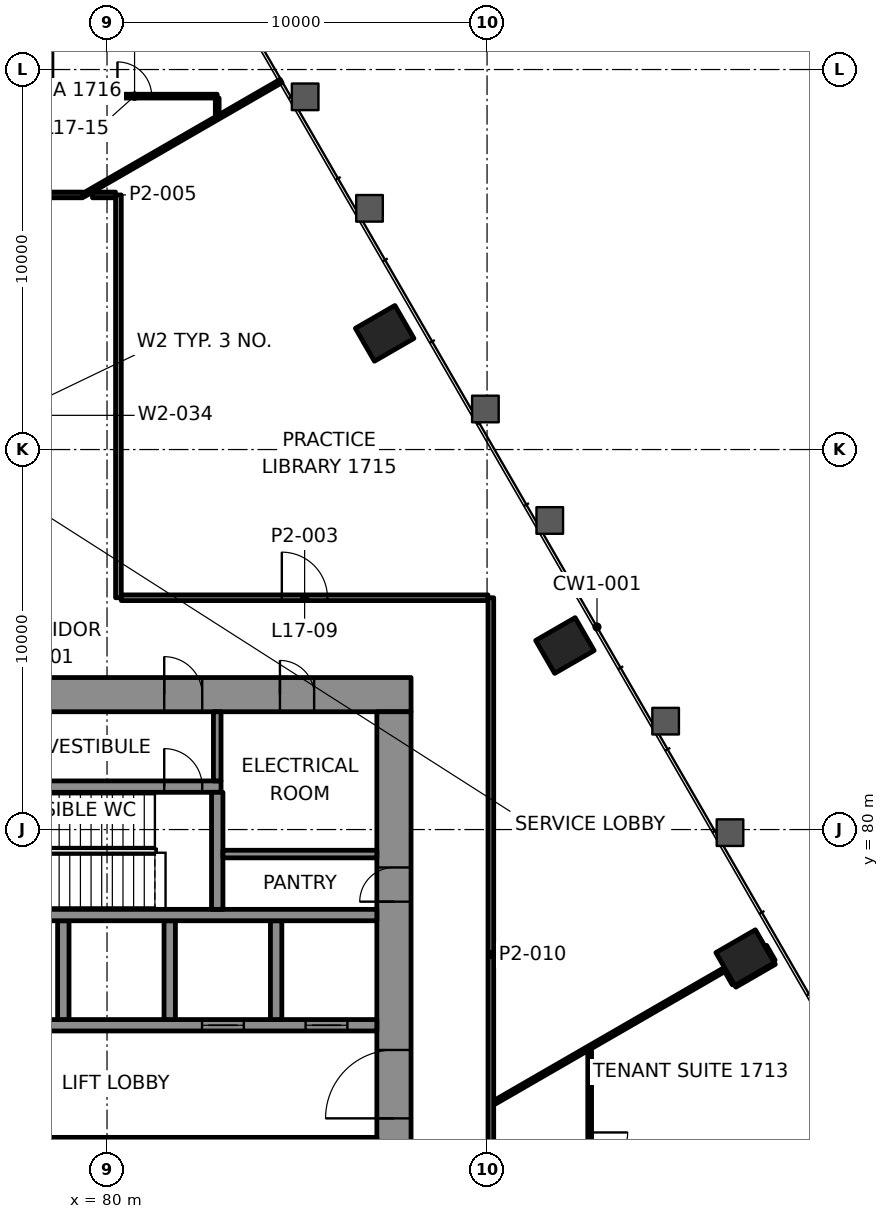
"""IFC4 building model, lengths in metres.
Left out: names, types, materials, properties, quantities, classifications, styles, units other than length and angle.
Written with IfcOpenShell. Run it as: python <this file> out.ifc"""

import sys

from ifc_helpers import new_model, si_unit, direction, frame, frame_2d, origin, origin_2d, place, context, subcontext, project, spatial, rectangle, extrude, element, fill, save


model = new_model("IFC4")
c1 = context("Model", 3, precision=1e-05, world=origin(), true_north=direction((0.0, 1.0)))
c2 = subcontext(c1, "Body", "Model", "MODEL_VIEW")
j1 = project(units=[si_unit("LENGTHUNIT", "METRE"), si_unit("PLANEANGLEUNIT", "RADIAN")], contexts=[c1])
p1 = place(None, origin())
s1 = spatial("IfcSite", under=j1, at=p1, CompositionType="ELEMENT")
p2 = place(p1, origin())
s2 = spatial("IfcBuilding", under=s1, at=p2, CompositionType="ELEMENT")
p3 = place(p2, frame((0.0, 0.0, 77.8)))
s3 = spatial("IfcBuildingStorey", under=s2, at=p3, CompositionType="ELEMENT", Elevation=77.8)
for number, where, z_axis, x_axis in (
    (1, (96.791, 76.628, -0.0), (0.0, 0.0, 1.0), (-0.5, 0.866, 0.0)),
    (2, (92.049, 84.843, -0.0), (0.0, 0.0, 1.0), (-0.5, 0.866, 0.0)),
    (3, (87.306, 93.057, -0.0), (0.0, 0.0, 1.0), (-0.5, 0.866, 0.0)),
):
    element("IfcColumn", number, at=place(p3, frame(where, z_axis=z_axis, x_axis=x_axis)), inside=s3, PredefinedType="COLUMN", context=c2, shape_type="SweptSolid", body=[
        extrude(rectangle(XDim=1.0, YDim=1.2, at=origin_2d()), origin(), (0.0, 0.0, 1.0), 4.2),
    ])
p4 = place(p3, frame((62.0, 83.55, 0.0), z_axis=(0.0, 0.0, 1.0), x_axis=(1.0, 0.0, 0.0)))
e4 = element("IfcWall", 4, at=p4, inside=s3, PredefinedType="SHEAR", context=c2, shape_type="SweptSolid", body=[
    extrude(rectangle(XDim=26.0, YDim=0.9, at=frame_2d((13.0, 0.0))), origin(), (0.0, 0.0, 1.0), 4.0),
])
p5 = place(p4, frame((5.695, 0.0, 0.0)))
e5 = element("IfcOpeningElement", 5, at=p5, cuts=e4, PredefinedType="OPENING", context=c2, shape_type="SweptSolid", body=[
    extrude(rectangle(XDim=1.0, YDim=2.1, at=frame_2d((0.5, 1.05))), frame((0.0, 0.46, 0.0), z_axis=(0.0, -1.0, 0.0), x_axis=(1.0, 0.0, 0.0)), (0.0, 0.0, 1.0), 0.92),
])
p6 = place(p4, frame((19.505, 0.0, 0.0)))
e6 = element("IfcOpeningElement", 6, at=p6, cuts=e4, PredefinedType="OPENING", context=c2, shape_type="SweptSolid", body=[
    extrude(rectangle(XDim=1.0, YDim=2.1, at=frame_2d((0.5, 1.05))), frame((0.0, 0.46, 0.0), z_axis=(0.0, -1.0, 0.0), x_axis=(1.0, 0.0, 0.0)), (0.0, 0.0, 1.0), 0.92),
])
p7 = place(p4, frame((3.45, 0.0, 0.0)))
e7 = element("IfcOpeningElement", 7, at=p7, cuts=e4, PredefinedType="OPENING", context=c2, shape_type="SweptSolid", body=[
    extrude(rectangle(XDim=0.9, YDim=2.1, at=frame_2d((0.45, 1.05))), frame((0.0, 0.46, 0.0), z_axis=(0.0, -1.0, 0.0), x_axis=(1.0, 0.0, 0.0)), (0.0, 0.0, 1.0), 0.92),
])
p8 = place(p4, frame((12.65, 0.0, 0.0)))
e8 = element("IfcOpeningElement", 8, at=p8, cuts=e4, PredefinedType="OPENING", context=c2, shape_type="SweptSolid", body=[
    extrude(rectangle(XDim=0.9, YDim=2.1, at=frame_2d((0.45, 1.05))), frame((0.0, 0.46, 0.0), z_axis=(0.0, -1.0, 0.0), x_axis=(1.0, 0.0, 0.0)), (0.0, 0.0, 1.0), 0.92),
])
p9 = place(p4, frame((22.55, 0.0, 0.0)))
e9 = element("IfcOpeningElement", 9, at=p9, cuts=e4, PredefinedType="OPENING", context=c2, shape_type="SweptSolid", body=[
    extrude(rectangle(XDim=0.9, YDim=2.1, at=frame_2d((0.45, 1.05))), frame((0.0, 0.46, 0.0), z_axis=(0.0, -1.0, 0.0), x_axis=(1.0, 0.0, 0.0)), (0.0, 0.0, 1.0), 0.92),
])
p10 = place(p3, frame((87.55, 66.9, 0.0), z_axis=(0.0, 0.0, 1.0), x_axis=(0.0, 1.0, 0.0)))
e10 = element("IfcWall", 10, at=p10, inside=s3, PredefinedType="SHEAR", context=c2, shape_type="SweptSolid", body=[
    extrude(rectangle(XDim=16.2, YDim=0.9, at=frame_2d((8.1, 0.0))), origin(), (0.0, 0.0, 1.0), 4.0),
])
p11 = place(p10, frame((5.5, 0.0, 0.0)))
e11 = element("IfcOpeningElement", 11, at=p11, cuts=e10, PredefinedType="OPENING", context=c2, shape_type="SweptSolid", body=[
    extrude(rectangle(XDim=1.8, YDim=2.1, at=frame_2d((0.9, 1.05))), frame((0.0, 0.46, 0.0), z_axis=(0.0, -1.0, 0.0), x_axis=(1.0, 0.0, 0.0)), (0.0, 0.0, 1.0), 0.92),
])
p12 = place(p10, frame((11.202, 0.0, 0.0)))
e12 = element("IfcOpeningElement", 12, at=p12, cuts=e10, PredefinedType="OPENING", context=c2, shape_type="SweptSolid", body=[
    extrude(rectangle(XDim=0.9, YDim=2.1, at=frame_2d((0.45, 1.05))), frame((0.0, 0.46, 0.0), z_axis=(0.0, -1.0, 0.0), x_axis=(1.0, 0.0, 0.0)), (0.0, 0.0, 1.0), 0.92),
])
p13 = place(p3, frame((70.3, 71.75, 0.0), z_axis=(0.0, 0.0, 1.0), x_axis=(1.0, 0.0, 0.0)))
e13 = element("IfcWall", 13, at=p13, inside=s3, PredefinedType="SHEAR", context=c2, shape_type="SweptSolid", body=[
    extrude(rectangle(XDim=16.8, YDim=0.3, at=frame_2d((8.4, 0.0))), origin(), (0.0, 0.0, 1.0), 4.0),
])
p14 = place(p13, frame((1.0, 0.0, 0.0)))
e14 = element("IfcOpeningElement", 14, at=p14, cuts=e13, PredefinedType="OPENING", context=c2, shape_type="SweptSolid", body=[
    extrude(rectangle(XDim=1.1, YDim=2.1, at=frame_2d((0.55, 1.05))), frame((0.0, 0.16, 0.0), z_axis=(0.0, -1.0, 0.0), x_axis=(1.0, 0.0, 0.0)), (0.0, 0.0, 1.0), 0.32),
])
p15 = place(p13, frame((3.8, 0.0, 0.0)))
e15 = element("IfcOpeningElement", 15, at=p15, cuts=e13, PredefinedType="OPENING", context=c2, shape_type="SweptSolid", body=[
    extrude(rectangle(XDim=1.1, YDim=2.1, at=frame_2d((0.55, 1.05))), frame((0.0, 0.16, 0.0), z_axis=(0.0, -1.0, 0.0), x_axis=(1.0, 0.0, 0.0)), (0.0, 0.0, 1.0), 0.32),
])
p16 = place(p13, frame((6.6, 0.0, 0.0)))
e16 = element("IfcOpeningElement", 16, at=p16, cuts=e13, PredefinedType="OPENING", context=c2, shape_type="SweptSolid", body=[
    extrude(rectangle(XDim=1.1, YDim=2.1, at=frame_2d((0.55, 1.05))), frame((0.0, 0.16, 0.0), z_axis=(0.0, -1.0, 0.0), x_axis=(1.0, 0.0, 0.0)), (0.0, 0.0, 1.0), 0.32),
])
p17 = place(p13, frame((9.4, 0.0, 0.0)))
e17 = element("IfcOpeningElement", 17, at=p17, cuts=e13, PredefinedType="OPENING", context=c2, shape_type="SweptSolid", body=[
    extrude(rectangle(XDim=1.1, YDim=2.1, at=frame_2d((0.55, 1.05))), frame((0.0, 0.16, 0.0), z_axis=(0.0, -1.0, 0.0), x_axis=(1.0, 0.0, 0.0)), (0.0, 0.0, 1.0), 0.32),
])
p18 = place(p13, frame((12.2, 0.0, 0.0)))
e18 = element("IfcOpeningElement", 18, at=p18, cuts=e13, PredefinedType="OPENING", context=c2, shape_type="SweptSolid", body=[
    extrude(rectangle(XDim=1.1, YDim=2.1, at=frame_2d((0.55, 1.05))), frame((0.0, 0.16, 0.0), z_axis=(0.0, -1.0, 0.0), x_axis=(1.0, 0.0, 0.0)), (0.0, 0.0, 1.0), 0.32),
])
p19 = place(p13, frame((14.925, 0.0, 0.0)))
e19 = element("IfcOpeningElement", 19, at=p19, cuts=e13, PredefinedType="OPENING", context=c2, shape_type="SweptSolid", body=[
    extrude(rectangle(XDim=1.1, YDim=2.1, at=frame_2d((0.55, 1.05))), frame((0.0, 0.16, 0.0), z_axis=(0.0, -1.0, 0.0), x_axis=(1.0, 0.0, 0.0)), (0.0, 0.0, 1.0), 0.32),
])
p20 = place(p3, frame((70.3, 74.85, 0.0), z_axis=(0.0, 0.0, 1.0), x_axis=(1.0, 0.0, 0.0)))
e20 = element("IfcWall", 20, at=p20, inside=s3, PredefinedType="SHEAR", context=c2, shape_type="SweptSolid", body=[
    extrude(rectangle(XDim=16.8, YDim=0.3, at=frame_2d((8.4, 0.0))), origin(), (0.0, 0.0, 1.0), 4.0),
])
p21 = place(p20, frame((3.8, 0.0, 0.0)))
e21 = element("IfcOpeningElement", 21, at=p21, cuts=e20, PredefinedType="OPENING", context=c2, shape_type="SweptSolid", body=[
    extrude(rectangle(XDim=1.1, YDim=2.1, at=frame_2d((0.55, 1.05))), frame((0.0, 0.16, 0.0), z_axis=(0.0, -1.0, 0.0), x_axis=(1.0, 0.0, 0.0)), (0.0, 0.0, 1.0), 0.32),
])
p22 = place(p20, frame((12.2, 0.0, 0.0)))
e22 = element("IfcOpeningElement", 22, at=p22, cuts=e20, PredefinedType="OPENING", context=c2, shape_type="SweptSolid", body=[
    extrude(rectangle(XDim=1.1, YDim=2.1, at=frame_2d((0.55, 1.05))), frame((0.0, 0.16, 0.0), z_axis=(0.0, -1.0, 0.0), x_axis=(1.0, 0.0, 0.0)), (0.0, 0.0, 1.0), 0.32),
])
p23 = place(p20, frame((14.925, 0.0, 0.0)))
e23 = element("IfcOpeningElement", 23, at=p23, cuts=e20, PredefinedType="OPENING", context=c2, shape_type="SweptSolid", body=[
    extrude(rectangle(XDim=1.1, YDim=2.1, at=frame_2d((0.55, 1.05))), frame((0.0, 0.16, 0.0), z_axis=(0.0, -1.0, 0.0), x_axis=(1.0, 0.0, 0.0)), (0.0, 0.0, 1.0), 0.32),
])
for number, where, z_axis, x_axis in (
    (24, (78.85, 75.0, 0.0), (0.0, 0.0, 1.0), (0.0, 1.0, 0.0)),
    (25, (81.65, 75.0, 0.0), (0.0, 0.0, 1.0), (0.0, 1.0, 0.0)),
    (26, (84.45, 75.0, 0.0), (0.0, 0.0, 1.0), (0.0, 1.0, 0.0)),
):
    element("IfcWall", number, at=place(p3, frame(where, z_axis=z_axis, x_axis=x_axis)), inside=s3, PredefinedType="SHEAR", context=c2, shape_type="SweptSolid", body=[
        extrude(rectangle(XDim=2.6, YDim=0.3, at=frame_2d((1.3, 0.0))), origin(), (0.0, 0.0, 1.0), 4.0),
    ])
p24 = place(p3, frame((64.35, 77.75, 0.0), z_axis=(0.0, 0.0, 1.0), x_axis=(1.0, 0.0, 0.0)))
e27 = element("IfcWall", 27, at=p24, inside=s3, PredefinedType="SHEAR", context=c2, shape_type="SweptSolid", body=[
    extrude(rectangle(XDim=22.75, YDim=0.3, at=frame_2d((11.375, 0.0))), origin(), (0.0, 0.0, 1.0), 4.0),
])
p25 = place(p24, frame((3.345, 0.0, 0.0)))
e28 = element("IfcOpeningElement", 28, at=p25, cuts=e27, PredefinedType="OPENING", context=c2, shape_type="SweptSolid", body=[
    extrude(rectangle(XDim=1.0, YDim=2.1, at=frame_2d((0.5, 1.05))), frame((0.0, 0.16, 0.0), z_axis=(0.0, -1.0, 0.0), x_axis=(1.0, 0.0, 0.0)), (0.0, 0.0, 1.0), 0.32),
])
p26 = place(p3, frame((76.14, 81.13, 0.0), z_axis=(0.0, 0.0, 1.0), x_axis=(1.0, 0.0, 0.0)))
e29 = element("IfcWall", 29, at=p26, inside=s3, PredefinedType="SHEAR", context=c2, shape_type="SweptSolid", body=[
    extrude(rectangle(XDim=6.86, YDim=0.3, at=frame_2d((3.43, 0.0))), origin(), (0.0, 0.0, 1.0), 4.0),
])
p27 = place(p26, frame((5.365, 0.0, 0.0)))
e30 = element("IfcOpeningElement", 30, at=p27, cuts=e29, PredefinedType="OPENING", context=c2, shape_type="SweptSolid", body=[
    extrude(rectangle(XDim=1.0, YDim=2.1, at=frame_2d((0.5, 1.05))), frame((0.0, 0.16, 0.0), z_axis=(0.0, -1.0, 0.0), x_axis=(1.0, 0.0, 0.0)), (0.0, 0.0, 1.0), 0.32),
])
p28 = place(p3, frame((82.9, 77.9, 0.0), z_axis=(0.0, 0.0, 1.0), x_axis=(0.0, 1.0, 0.0)))
e31 = element("IfcWall", 31, at=p28, inside=s3, PredefinedType="SHEAR", context=c2, shape_type="SweptSolid", body=[
    extrude(rectangle(XDim=3.08, YDim=0.3, at=frame_2d((1.54, 0.0))), origin(), (0.0, 0.0, 1.0), 4.0),
])
p29 = place(p3, frame((80.375, 86.1, 0.0), z_axis=(0.0, 0.0, 1.0), x_axis=(1.0, 0.0, 0.0)))
e32 = element("IfcWall", 32, at=p29, inside=s3, PredefinedType="PARTITIONING", context=c2, shape_type="SweptSolid", body=[
    extrude(rectangle(XDim=9.649, YDim=0.15, at=frame_2d((4.825, 0.0))), origin(), (0.0, 0.0, 1.0), 3.4),
])
p30 = place(p29, frame((4.225, 0.0, 0.0)))
e33 = element("IfcOpeningElement", 33, at=p30, cuts=e32, PredefinedType="OPENING", context=c2, shape_type="SweptSolid", body=[
    extrude(rectangle(XDim=1.2, YDim=2.1, at=frame_2d((0.6, 1.05))), frame((0.0, 0.085, 0.0), z_axis=(0.0, -1.0, 0.0), x_axis=(1.0, 0.0, 0.0)), (0.0, 0.0, 1.0), 0.17),
])
p31 = place(p3, frame((75.975, 96.7, 0.0), z_axis=(0.0, 0.0, 1.0), x_axis=(1.0, 0.0, 0.0)))
e34 = element("IfcWall", 34, at=p31, inside=s3, PredefinedType="PARTITIONING", context=c2, shape_type="SweptSolid", body=[
    extrude(rectangle(XDim=3.387, YDim=0.15, at=frame_2d((1.693, 0.0))), origin(), (0.0, 0.0, 1.0), 3.4),
])
p32 = place(p31, frame((1.194, 0.0, 0.0)))
e35 = element("IfcOpeningElement", 35, at=p32, cuts=e34, PredefinedType="OPENING", context=c2, shape_type="SweptSolid", body=[
    extrude(rectangle(XDim=1.0, YDim=2.1, at=frame_2d((0.5, 1.05))), frame((0.0, 0.085, 0.0), z_axis=(0.0, -1.0, 0.0), x_axis=(1.0, 0.0, 0.0)), (0.0, 0.0, 1.0), 0.17),
])
p33 = place(p3, frame((78.55, 99.3, 0.0), z_axis=(0.0, 0.0, 1.0), x_axis=(1.0, 0.0, 0.0)))
e36 = element("IfcWall", 36, at=p33, inside=s3, PredefinedType="PARTITIONING", context=c2, shape_type="SweptSolid", body=[
    extrude(rectangle(XDim=4.349, YDim=0.1, at=frame_2d((2.175, 0.0))), origin(), (0.0, 0.0, 1.0), 3.4),
])
p34 = place(p33, frame((1.725, 0.0, 0.0)))
e37 = element("IfcOpeningElement", 37, at=p34, cuts=e36, PredefinedType="OPENING", context=c2, shape_type="SweptSolid", body=[
    extrude(rectangle(XDim=0.9, YDim=2.1, at=frame_2d((0.45, 1.05))), frame((0.0, 0.06, 0.0), z_axis=(0.0, -1.0, 0.0), x_axis=(1.0, 0.0, 0.0)), (0.0, 0.0, 1.0), 0.12),
])
p35 = place(p3, frame((96.522, 75.896, 0.0), z_axis=(0.0, 0.0, 1.0), x_axis=(0.865978732077, 0.500080829057, 0.0)))
e38 = element("IfcWall", 38, at=p35, inside=s3, PredefinedType="PARTITIONING", context=c2, shape_type="SweptSolid", body=[
    extrude(rectangle(XDim=1.199, YDim=0.1, at=frame_2d((0.6, 0.0))), origin(), (0.0, 0.0, 1.0), 3.165),
])
p36 = place(p3, frame((90.201, 72.824, 0.0), z_axis=(0.0, 0.0, 1.0), x_axis=(0.866028979627, 0.499993806408, 0.0)))
e39 = element("IfcWall", 39, at=p36, inside=s3, PredefinedType="PARTITIONING", context=c2, shape_type="SweptSolid", body=[
    extrude(rectangle(XDim=7.009, YDim=0.1, at=frame_2d((3.505, 0.0))), origin(), (0.0, 0.0, 1.0), 3.4),
])
p37 = place(p3, frame((79.387, 96.7, 0.0), z_axis=(0.0, 0.0, 1.0), x_axis=(0.866032365835, 0.499987941182, 0.0)))
e40 = element("IfcWall", 40, at=p37, inside=s3, PredefinedType="PARTITIONING", context=c2, shape_type="SweptSolid", body=[
    extrude(rectangle(XDim=5.997, YDim=0.1, at=frame_2d((2.999, 0.0))), origin(), (0.0, 0.0, 1.0), 3.165),
])
p38 = place(p3, frame((92.7, 74.179, 0.0), z_axis=(0.0, 0.0, 1.0), x_axis=(0.0, -1.0, 0.0)))
e41 = element("IfcWall", 41, at=p38, inside=s3, PredefinedType="PARTITIONING", context=c2, shape_type="SweptSolid", body=[
    extrude(rectangle(XDim=5.299, YDim=0.1, at=frame_2d((2.649, 0.0))), origin(), (0.0, 0.0, 1.0), 3.4),
])
p39 = place(p38, frame((2.149, 0.0, 0.0)))
e42 = element("IfcOpeningElement", 42, at=p39, cuts=e41, PredefinedType="OPENING", context=c2, shape_type="SweptSolid", body=[
    extrude(rectangle(XDim=1.0, YDim=2.1, at=frame_2d((0.5, 1.05))), frame((0.0, 0.06, 0.0), z_axis=(0.0, -1.0, 0.0), x_axis=(1.0, 0.0, 0.0)), (0.0, 0.0, 1.0), 0.12),
])
p40 = place(p3, frame((90.1, 86.099, 0.0), z_axis=(0.0, 0.0, 1.0), x_axis=(0.0, -1.0, 0.0)))
e43 = element("IfcWall", 43, at=p40, inside=s3, PredefinedType="PARTITIONING", context=c2, shape_type="SweptSolid", body=[
    extrude(rectangle(XDim=18.778, YDim=0.15, at=frame_2d((9.389, 0.0))), origin(), (0.0, 0.0, 1.0), 3.4),
])
p41 = place(p40, frame((15.455, 0.0, 0.0)))
e44 = element("IfcOpeningElement", 44, at=p41, cuts=e43, PredefinedType="OPENING", context=c2, shape_type="SweptSolid", body=[
    extrude(rectangle(XDim=1.0, YDim=2.1, at=frame_2d((0.5, 1.05))), frame((0.0, 0.085, 0.0), z_axis=(0.0, -1.0, 0.0), x_axis=(1.0, 0.0, 0.0)), (0.0, 0.0, 1.0), 0.17),
])
p42 = place(p3, frame((82.9, 98.816, 0.0), z_axis=(0.0, 0.0, 1.0), x_axis=(0.0, 1.0, 0.0)))
e45 = element("IfcWall", 45, at=p42, inside=s3, PredefinedType="PARTITIONING", context=c2, shape_type="SweptSolid", body=[
    extrude(rectangle(XDim=0.433, YDim=0.1, at=frame_2d((0.217, 0.0))), origin(), (0.0, 0.0, 1.0), 3.4),
])
p43 = place(p3, frame((80.3, 86.1, 0.0), z_axis=(0.0, 0.0, 1.0), x_axis=(0.0, 1.0, 0.0)))
e46 = element("IfcWall", 46, at=p43, inside=s3, PredefinedType="PARTITIONING", context=c2, shape_type="SweptSolid", body=[
    extrude(rectangle(XDim=10.599, YDim=0.15, at=frame_2d((5.3, 0.0))), origin(), (0.0, 0.0, 1.0), 3.4),
])
p44 = place(p3, frame((97.536, 76.539, 0.0), z_axis=(0.0, 0.0, 1.0), x_axis=(-0.499879237999, 0.866095114533, 0.0)))
e47 = element("IfcWall", 47, at=p44, inside=s3, PredefinedType="PARTITIONING", context=c2, shape_type="SweptSolid", body=[
    extrude(rectangle(XDim=0.449, YDim=0.1, at=frame_2d((0.225, 0.0))), origin(), (0.0, 0.0, 1.0), 3.4),
])
p45 = place(p3, frame((96.496, 75.939, 0.0), z_axis=(0.0, 0.0, 1.0), x_axis=(-0.499757756434, 0.866165218006, 0.0)))
e48 = element("IfcWall", 48, at=p45, inside=s3, PredefinedType="PARTITIONING", context=c2, shape_type="SweptSolid", body=[
    extrude(rectangle(XDim=0.399, YDim=0.1, at=frame_2d((0.2, 0.0))), origin(), (0.0, 0.0, 1.0), 3.4),
])
p46 = place(p3, frame((79.617, 96.7, 0.0), z_axis=(0.0, 0.0, 1.0), x_axis=(1.0, 0.0, 0.0)))
e49 = element("IfcWall", 49, at=p46, inside=s3, PredefinedType="PARTITIONING", context=c2, shape_type="SweptSolid", body=[
    extrude(rectangle(XDim=0.607, YDim=0.15, at=frame_2d((0.304, 0.0))), origin(), (0.0, 0.0, 1.0), 3.4),
])
p47 = place(p3, frame((83.05, 79.355, 0.0), z_axis=(0.0, 0.0, 1.0), x_axis=(1.0, 0.0, 0.0)))
e50 = element("IfcWall", 50, at=p47, inside=s3, PredefinedType="PARTITIONING", context=c2, shape_type="SweptSolid", body=[
    extrude(rectangle(XDim=4.05, YDim=0.2, at=frame_2d((2.025, 0.0))), origin(), (0.0, 0.0, 1.0), 4.0),
])
p48 = place(p3, frame((82.9, 81.28, 0.0), z_axis=(0.0, 0.0, 1.0), x_axis=(0.0, 1.0, 0.0)))
e51 = element("IfcWall", 51, at=p48, inside=s3, PredefinedType="PARTITIONING", context=c2, shape_type="SweptSolid", body=[
    extrude(rectangle(XDim=1.82, YDim=0.2, at=frame_2d((0.91, 0.0))), origin(), (0.0, 0.0, 1.0), 4.0),
])
p49 = place(p30, origin())
e52 = element("IfcDoor", 52, at=p49, inside=s3, OperationType="DOUBLE_DOOR_SINGLE_SWING", PredefinedType="DOOR", context=c2, shape_type="SweptSolid", body=[
    extrude(rectangle(XDim=1.2, YDim=2.1, at=frame_2d((0.6, 1.05))), frame((0.0, 0.025, 0.0), z_axis=(0.0, -1.0, 0.0), x_axis=(1.0, 0.0, 0.0)), (0.0, 0.0, 1.0), 0.05),
])
fill(e33, e52)
p50 = place(p34, origin())
e53 = element("IfcDoor", 53, at=p50, inside=s3, OperationType="SINGLE_SWING_RIGHT", PredefinedType="DOOR", context=c2, shape_type="SweptSolid", body=[
    extrude(rectangle(XDim=0.9, YDim=2.1, at=frame_2d((0.45, 1.05))), frame((0.0, 0.025, 0.0), z_axis=(0.0, -1.0, 0.0), x_axis=(1.0, 0.0, 0.0)), (0.0, 0.0, 1.0), 0.05),
])
fill(e37, e53)
p51 = place(p39, origin())
e54 = element("IfcDoor", 54, at=p51, inside=s3, OperationType="SINGLE_SWING_LEFT", PredefinedType="DOOR", context=c2, shape_type="SweptSolid", body=[
    extrude(rectangle(XDim=1.0, YDim=2.1, at=frame_2d((0.5, 1.05))), frame((0.0, 0.025, 0.0), z_axis=(0.0, -1.0, 0.0), x_axis=(1.0, 0.0, 0.0)), (0.0, 0.0, 1.0), 0.05),
])
fill(e42, e54)
p52 = place(p22, origin())
e55 = element("IfcDoor", 55, at=p52, inside=s3, OperationType="DOUBLE_DOOR_SLIDING", PredefinedType="DOOR", context=c2, shape_type="SweptSolid", body=[
    extrude(rectangle(XDim=1.1, YDim=2.1, at=frame_2d((0.55, 1.05))), frame((0.0, 0.025, 0.0), z_axis=(0.0, -1.0, 0.0), x_axis=(1.0, 0.0, 0.0)), (0.0, 0.0, 1.0), 0.05),
])
fill(e22, e55)
p53 = place(p23, origin())
e56 = element("IfcDoor", 56, at=p53, inside=s3, OperationType="DOUBLE_DOOR_SLIDING", PredefinedType="DOOR", context=c2, shape_type="SweptSolid", body=[
    extrude(rectangle(XDim=1.1, YDim=2.1, at=frame_2d((0.55, 1.05))), frame((0.0, 0.025, 0.0), z_axis=(0.0, -1.0, 0.0), x_axis=(1.0, 0.0, 0.0)), (0.0, 0.0, 1.0), 0.05),
])
fill(e23, e56)
p54 = place(p27, origin())
e57 = element("IfcDoor", 57, at=p54, inside=s3, OperationType="SINGLE_SWING_RIGHT", PredefinedType="DOOR", context=c2, shape_type="SweptSolid", body=[
    extrude(rectangle(XDim=1.0, YDim=2.1, at=frame_2d((0.5, 1.05))), frame((0.0, 0.025, 0.0), z_axis=(0.0, -1.0, 0.0), x_axis=(1.0, 0.0, 0.0)), (0.0, 0.0, 1.0), 0.05),
])
fill(e30, e57)
p55 = place(p6, origin())
e58 = element("IfcDoor", 58, at=p55, inside=s3, OperationType="SINGLE_SWING_LEFT", PredefinedType="DOOR", context=c2, shape_type="SweptSolid", body=[
    extrude(rectangle(XDim=1.0, YDim=2.1, at=frame_2d((0.5, 1.05))), frame((0.0, 0.17, 0.0), z_axis=(0.0, -1.0, 0.0), x_axis=(1.0, 0.0, 0.0)), (0.0, 0.0, 1.0), 0.34),
])
fill(e6, e58)
p56 = place(p11, origin())
e59 = element("IfcDoor", 59, at=p56, inside=s3, OperationType="SINGLE_SWING_RIGHT", PredefinedType="DOOR", context=c2, shape_type="SweptSolid", body=[
    extrude(rectangle(XDim=1.8, YDim=2.1, at=frame_2d((0.9, 1.05))), frame((0.0, 0.17, 0.0), z_axis=(0.0, -1.0, 0.0), x_axis=(1.0, 0.0, 0.0)), (0.0, 0.0, 1.0), 0.34),
])
fill(e11, e59)
p57 = place(p12, origin())
e60 = element("IfcDoor", 60, at=p57, inside=s3, OperationType="SINGLE_SWING_RIGHT", PredefinedType="DOOR", context=c2, shape_type="SweptSolid", body=[
    extrude(rectangle(XDim=0.9, YDim=2.1, at=frame_2d((0.45, 1.05))), frame((0.0, 0.17, 0.0), z_axis=(0.0, -1.0, 0.0), x_axis=(1.0, 0.0, 0.0)), (0.0, 0.0, 1.0), 0.34),
])
fill(e12, e60)
p58 = place(p9, origin())
e61 = element("IfcDoor", 61, at=p58, inside=s3, OperationType="SINGLE_SWING_LEFT", PredefinedType="DOOR", context=c2, shape_type="SweptSolid", body=[
    extrude(rectangle(XDim=0.9, YDim=2.1, at=frame_2d((0.45, 1.05))), frame((0.0, 0.17, 0.0), z_axis=(0.0, -1.0, 0.0), x_axis=(1.0, 0.0, 0.0)), (0.0, 0.0, 1.0), 0.34),
])
fill(e9, e61)
save(model, sys.argv[1])
